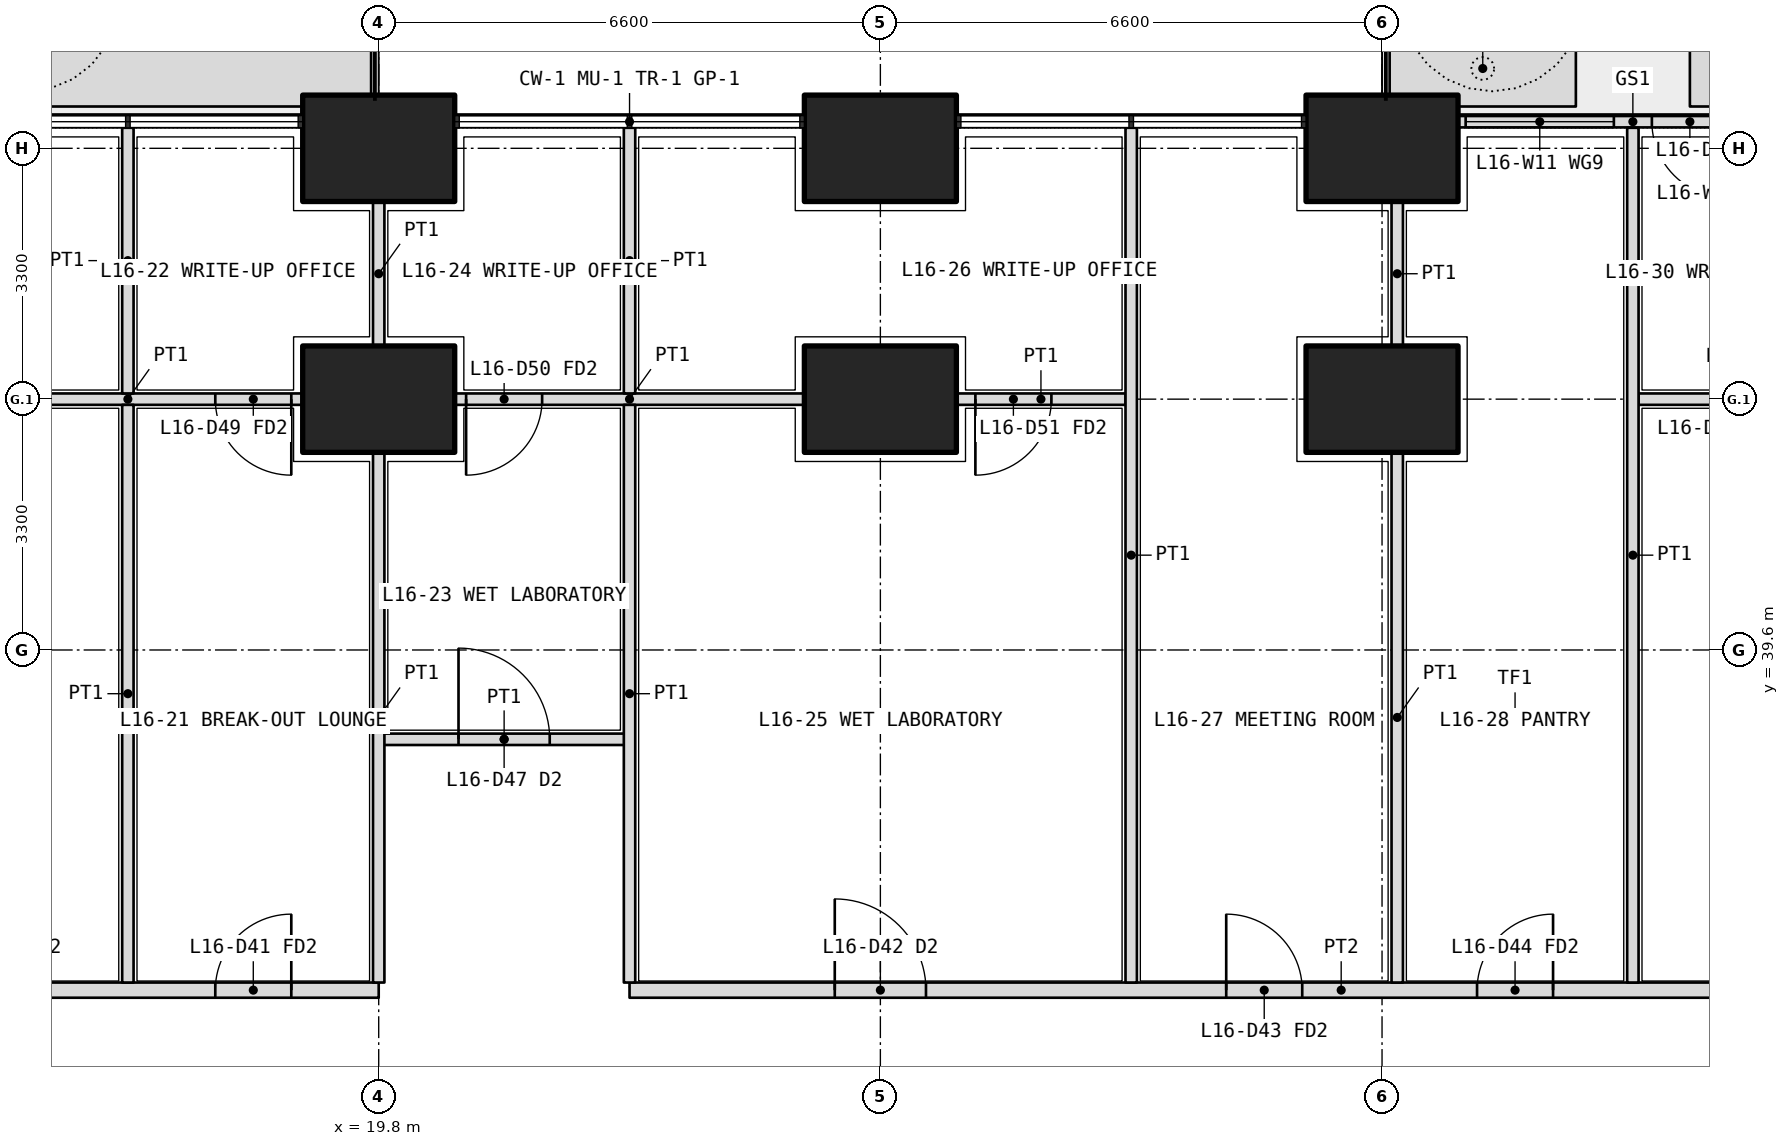
"""IFC4 building model, lengths in metres.
Left out: names, types, materials, properties, quantities, classifications, styles, units other than length and angle.
Written with IfcOpenShell. Run it as: python <this file> out.ifc"""

import sys

from ifc_helpers import new_model, si_unit, direction, frame, frame_2d, origin, origin_2d, place, context, subcontext, project, spatial, polyline, rectangle, outline, extrude, element, fill, save


model = new_model("IFC4")
c1 = context("Model", 3, precision=1e-05, world=origin(), true_north=direction((0.0, 1.0)))
c2 = subcontext(c1, "Body", "Model", "MODEL_VIEW")
j1 = project(units=[si_unit("LENGTHUNIT", "METRE"), si_unit("PLANEANGLEUNIT", "RADIAN")], contexts=[c1])
p1 = place(None, origin())
s1 = spatial("IfcSite", under=j1, at=p1, CompositionType="ELEMENT")
p2 = place(p1, origin())
s2 = spatial("IfcBuilding", under=s1, at=p2, CompositionType="ELEMENT")
p3 = place(p2, frame((0.0, 0.0, 71.7)))
s3 = spatial("IfcBuildingStorey", under=s2, at=p3, CompositionType="ELEMENT", Elevation=71.7)
for number, where, z_axis, x_axis in (
    (1, (19.8, 46.2, 0.0), (0.0, 0.0, 1.0), (1.0, 0.0, 0.0)),
    (2, (26.4, 46.2, 0.0), (0.0, 0.0, 1.0), (1.0, 0.0, 0.0)),
    (3, (33.0, 46.2, 0.0), (0.0, 0.0, 1.0), (1.0, 0.0, 0.0)),
    (4, (19.8, 42.9, 0.0), (0.0, 0.0, 1.0), (1.0, 0.0, 0.0)),
    (5, (26.4, 42.9, 0.0), (0.0, 0.0, 1.0), (1.0, 0.0, 0.0)),
    (6, (33.0, 42.9, 0.0), (0.0, 0.0, 1.0), (1.0, 0.0, 0.0)),
):
    element("IfcColumn", number, at=place(p3, frame(where, z_axis=z_axis, x_axis=x_axis)), inside=s3, PredefinedType="COLUMN", context=c2, shape_type="SweptSolid", body=[
        extrude(rectangle(XDim=2.0, YDim=1.4, at=origin_2d()), origin(), (0.0, 0.0, 1.0), 4.2),
    ])
p4 = place(p3, origin())
e7 = element("IfcWall", 7, at=p4, inside=s3, PredefinedType="USERDEFINED", context=c2, shape_type="SweptSolid", body=[
    extrude(outline(polyline([(10.65, 46.75), (19.7, 46.75), (19.7, 47.75), (10.65, 47.75), (10.65, 46.75)]), holes=[polyline([(10.8, 46.9), (19.55, 46.9), (19.55, 47.6), (10.8, 47.6), (10.8, 46.9)])]), origin(), (0.0, 0.0, 1.0), 1.05),
])
p5 = place(p3, origin())
e8 = element("IfcWall", 8, at=p5, inside=s3, PredefinedType="USERDEFINED", context=c2, shape_type="SweptSolid", body=[
    extrude(outline(polyline([(33.1, 46.75), (35.55, 46.75), (35.55, 47.75), (33.1, 47.75), (33.1, 46.75)]), holes=[polyline([(33.25, 46.9), (35.4, 46.9), (35.4, 47.6), (33.25, 47.6), (33.25, 46.9)])]), origin(), (0.0, 0.0, 1.0), 1.05),
])
p6 = place(p3, origin())
e9 = element("IfcWall", 9, at=p6, inside=s3, PredefinedType="USERDEFINED", context=c2, shape_type="SweptSolid", body=[
    extrude(outline(polyline([(37.05, 46.75), (46.1, 46.75), (46.1, 47.75), (37.05, 47.75), (37.05, 46.75)]), holes=[polyline([(37.2, 46.9), (45.95, 46.9), (45.95, 47.6), (37.2, 47.6), (37.2, 46.9)])]), origin(), (0.0, 0.0, 1.0), 1.05),
])
p7 = place(p3, frame((38.6, 46.55, 0.0), z_axis=(0.0, 0.0, 1.0), x_axis=(-1.0, 0.0, 0.0)))
e10 = element("IfcWall", 10, at=p7, inside=s3, PredefinedType="SOLIDWALL", context=c2, shape_type="SweptSolid", body=[
    extrude(rectangle(XDim=4.6, YDim=0.15, at=frame_2d((2.3, 0.0))), origin(), (0.0, 0.0, 1.0), 2.05),
])
p8 = place(p7, frame((1.05, 0.0, 0.0)))
e11 = element("IfcOpeningElement", 11, at=p8, cuts=e10, PredefinedType="OPENING", context=c2, shape_type="SweptSolid", body=[
    extrude(rectangle(XDim=1.0, YDim=2.0, at=frame_2d((0.5, 1.0))), frame((0.0, 0.085, 0.0), z_axis=(0.0, -1.0, 0.0), x_axis=(1.0, 0.0, 0.0)), (0.0, 0.0, 1.0), 0.17),
])
p9 = place(p7, frame((0.1, 0.0, 0.1)))
e12 = element("IfcOpeningElement", 12, at=p9, cuts=e10, PredefinedType="OPENING", context=c2, shape_type="SweptSolid", body=[
    extrude(rectangle(XDim=0.85, YDim=1.65, at=frame_2d((0.425, 0.825))), frame((0.0, 0.085, 0.0), z_axis=(0.0, -1.0, 0.0), x_axis=(1.0, 0.0, 0.0)), (0.0, 0.0, 1.0), 0.17),
])
p10 = place(p7, frame((2.55, 0.0, 0.1)))
e13 = element("IfcOpeningElement", 13, at=p10, cuts=e10, PredefinedType="OPENING", context=c2, shape_type="SweptSolid", body=[
    extrude(rectangle(XDim=1.95, YDim=1.65, at=frame_2d((0.975, 0.825))), frame((0.0, 0.085, 0.0), z_axis=(0.0, -1.0, 0.0), x_axis=(1.0, 0.0, 0.0)), (0.0, 0.0, 1.0), 0.17),
])
p11 = place(p3, frame((10.975, 35.125, 0.0), z_axis=(0.0, 0.0, 1.0), x_axis=(1.0, 0.0, 0.0)))
e14 = element("IfcWall", 14, at=p11, inside=s3, PredefinedType="PARTITIONING", context=c2, shape_type="SweptSolid", body=[
    extrude(rectangle(XDim=8.825, YDim=0.2, at=frame_2d((4.413, 0.0))), origin(), (0.0, 0.0, 1.0), 2.55),
])
p12 = place(p11, frame((2.312, 0.0, 0.0)))
e15 = element("IfcOpeningElement", 15, at=p12, cuts=e14, PredefinedType="OPENING", context=c2, shape_type="SweptSolid", body=[
    extrude(rectangle(XDim=1.0, YDim=2.1, at=frame_2d((0.5, 1.05))), frame((0.0, 0.11, 0.0), z_axis=(0.0, -1.0, 0.0), x_axis=(1.0, 0.0, 0.0)), (0.0, 0.0, 1.0), 0.22),
])
p13 = place(p11, frame((6.675, 0.0, 0.0)))
e16 = element("IfcOpeningElement", 16, at=p13, cuts=e14, PredefinedType="OPENING", context=c2, shape_type="SweptSolid", body=[
    extrude(rectangle(XDim=1.0, YDim=2.1, at=frame_2d((0.5, 1.05))), frame((0.0, 0.11, 0.0), z_axis=(0.0, -1.0, 0.0), x_axis=(1.0, 0.0, 0.0)), (0.0, 0.0, 1.0), 0.22),
])
p14 = place(p3, frame((23.1, 35.125, 0.0), z_axis=(0.0, 0.0, 1.0), x_axis=(1.0, 0.0, 0.0)))
e17 = element("IfcWall", 17, at=p14, inside=s3, PredefinedType="PARTITIONING", context=c2, shape_type="SweptSolid", body=[
    extrude(rectangle(XDim=18.725, YDim=0.2, at=frame_2d((9.362, 0.0))), origin(), (0.0, 0.0, 1.0), 2.55),
])
p15 = place(p14, frame((2.7, 0.0, 0.0)))
e18 = element("IfcOpeningElement", 18, at=p15, cuts=e17, PredefinedType="OPENING", context=c2, shape_type="SweptSolid", body=[
    extrude(rectangle(XDim=1.2, YDim=2.1, at=frame_2d((0.6, 1.05))), frame((0.0, 0.11, 0.0), z_axis=(0.0, -1.0, 0.0), x_axis=(1.0, 0.0, 0.0)), (0.0, 0.0, 1.0), 0.22),
])
p16 = place(p14, frame((7.85, 0.0, 0.0)))
e19 = element("IfcOpeningElement", 19, at=p16, cuts=e17, PredefinedType="OPENING", context=c2, shape_type="SweptSolid", body=[
    extrude(rectangle(XDim=1.0, YDim=2.1, at=frame_2d((0.5, 1.05))), frame((0.0, 0.11, 0.0), z_axis=(0.0, -1.0, 0.0), x_axis=(1.0, 0.0, 0.0)), (0.0, 0.0, 1.0), 0.22),
])
p17 = place(p14, frame((11.15, 0.0, 0.0)))
e20 = element("IfcOpeningElement", 20, at=p17, cuts=e17, PredefinedType="OPENING", context=c2, shape_type="SweptSolid", body=[
    extrude(rectangle(XDim=1.0, YDim=2.1, at=frame_2d((0.5, 1.05))), frame((0.0, 0.11, 0.0), z_axis=(0.0, -1.0, 0.0), x_axis=(1.0, 0.0, 0.0)), (0.0, 0.0, 1.0), 0.22),
])
p18 = place(p14, frame((15.312, 0.0, 0.0)))
e21 = element("IfcOpeningElement", 21, at=p18, cuts=e17, PredefinedType="OPENING", context=c2, shape_type="SweptSolid", body=[
    extrude(rectangle(XDim=1.2, YDim=2.1, at=frame_2d((0.6, 1.05))), frame((0.0, 0.11, 0.0), z_axis=(0.0, -1.0, 0.0), x_axis=(1.0, 0.0, 0.0)), (0.0, 0.0, 1.0), 0.22),
])
p19 = place(p3, frame((38.6, 42.9, 0.0), z_axis=(0.0, 0.0, 1.0), x_axis=(-1.0, 0.0, 0.0)))
e22 = element("IfcWall", 22, at=p19, inside=s3, PredefinedType="PARTITIONING", context=c2, shape_type="SweptSolid", body=[
    extrude(rectangle(XDim=2.225, YDim=0.15, at=frame_2d((1.113, 0.0))), origin(), (0.0, 0.0, 1.0), 2.55),
])
p20 = place(p19, frame((0.25, 0.0, 0.0)))
e23 = element("IfcOpeningElement", 23, at=p20, cuts=e22, PredefinedType="OPENING", context=c2, shape_type="SweptSolid", body=[
    extrude(rectangle(XDim=1.0, YDim=2.1, at=frame_2d((0.5, 1.05))), frame((0.0, 0.085, 0.0), z_axis=(0.0, -1.0, 0.0), x_axis=(1.0, 0.0, 0.0)), (0.0, 0.0, 1.0), 0.17),
])
p21 = place(p3, frame((29.625, 42.9, 0.0), z_axis=(0.0, 0.0, 1.0), x_axis=(-1.0, 0.0, 0.0)))
e24 = element("IfcWall", 24, at=p21, inside=s3, PredefinedType="PARTITIONING", context=c2, shape_type="SweptSolid", body=[
    extrude(rectangle(XDim=2.225, YDim=0.15, at=frame_2d((1.113, 0.0))), origin(), (0.0, 0.0, 1.0), 2.55),
])
p22 = place(p21, frame((0.975, 0.0, 0.0)))
e25 = element("IfcOpeningElement", 25, at=p22, cuts=e24, PredefinedType="OPENING", context=c2, shape_type="SweptSolid", body=[
    extrude(rectangle(XDim=1.0, YDim=2.1, at=frame_2d((0.5, 1.05))), frame((0.0, 0.085, 0.0), z_axis=(0.0, -1.0, 0.0), x_axis=(1.0, 0.0, 0.0)), (0.0, 0.0, 1.0), 0.17),
])
p23 = place(p3, frame((25.4, 42.9, 0.0), z_axis=(0.0, 0.0, 1.0), x_axis=(-1.0, 0.0, 0.0)))
e26 = element("IfcWall", 26, at=p23, inside=s3, PredefinedType="PARTITIONING", context=c2, shape_type="SweptSolid", body=[
    extrude(rectangle(XDim=4.6, YDim=0.15, at=frame_2d((2.3, 0.0))), origin(), (0.0, 0.0, 1.0), 2.55),
])
p24 = place(p23, frame((3.45, 0.0, 0.0)))
e27 = element("IfcOpeningElement", 27, at=p24, cuts=e26, PredefinedType="OPENING", context=c2, shape_type="SweptSolid", body=[
    extrude(rectangle(XDim=1.0, YDim=2.1, at=frame_2d((0.5, 1.05))), frame((0.0, 0.085, 0.0), z_axis=(0.0, -1.0, 0.0), x_axis=(1.0, 0.0, 0.0)), (0.0, 0.0, 1.0), 0.17),
])
p25 = place(p3, frame((18.8, 42.9, 0.0), z_axis=(0.0, 0.0, 1.0), x_axis=(-1.0, 0.0, 0.0)))
e28 = element("IfcWall", 28, at=p25, inside=s3, PredefinedType="PARTITIONING", context=c2, shape_type="SweptSolid", body=[
    extrude(rectangle(XDim=4.6, YDim=0.15, at=frame_2d((2.3, 0.0))), origin(), (0.0, 0.0, 1.0), 2.55),
])
p26 = place(p25, frame((0.15, 0.0, 0.0)))
e29 = element("IfcOpeningElement", 29, at=p26, cuts=e28, PredefinedType="OPENING", context=c2, shape_type="SweptSolid", body=[
    extrude(rectangle(XDim=1.0, YDim=2.1, at=frame_2d((0.5, 1.05))), frame((0.0, 0.085, 0.0), z_axis=(0.0, -1.0, 0.0), x_axis=(1.0, 0.0, 0.0)), (0.0, 0.0, 1.0), 0.17),
])
p27 = place(p3, frame((19.8, 38.425, 0.0), z_axis=(0.0, 0.0, 1.0), x_axis=(1.0, 0.0, 0.0)))
e30 = element("IfcWall", 30, at=p27, inside=s3, PredefinedType="PARTITIONING", context=c2, shape_type="SweptSolid", body=[
    extrude(rectangle(XDim=3.3, YDim=0.15, at=frame_2d((1.65, 0.0))), origin(), (0.0, 0.0, 1.0), 2.55),
])
p28 = place(p27, frame((1.05, 0.0, 0.0)))
e31 = element("IfcOpeningElement", 31, at=p28, cuts=e30, PredefinedType="OPENING", context=c2, shape_type="SweptSolid", body=[
    extrude(rectangle(XDim=1.2, YDim=2.1, at=frame_2d((0.6, 1.05))), frame((0.0, 0.085, 0.0), z_axis=(0.0, -1.0, 0.0), x_axis=(1.0, 0.0, 0.0)), (0.0, 0.0, 1.0), 0.17),
])
p29 = place(p3, frame((33.2, 45.5, 0.0), z_axis=(0.0, 0.0, 1.0), x_axis=(0.0, -1.0, 0.0)))
e32 = element("IfcWall", 32, at=p29, inside=s3, PredefinedType="PARTITIONING", context=c2, shape_type="SweptSolid", body=[
    extrude(rectangle(XDim=1.9, YDim=0.15, at=frame_2d((0.95, 0.0))), origin(), (0.0, 0.0, 1.0), 2.55),
])
p30 = place(p3, frame((33.2, 42.2, 0.0), z_axis=(0.0, 0.0, 1.0), x_axis=(0.0, -1.0, 0.0)))
e33 = element("IfcWall", 33, at=p30, inside=s3, PredefinedType="PARTITIONING", context=c2, shape_type="SweptSolid", body=[
    extrude(rectangle(XDim=6.975, YDim=0.15, at=frame_2d((3.487, 0.0))), origin(), (0.0, 0.0, 1.0), 2.55),
])
p31 = place(p3, frame((36.3, 46.47, 0.0), z_axis=(0.0, 0.0, 1.0), x_axis=(0.0, -1.0, 0.0)))
e34 = element("IfcWall", 34, at=p31, inside=s3, PredefinedType="PARTITIONING", context=c2, shape_type="SweptSolid", body=[
    extrude(rectangle(XDim=11.245, YDim=0.15, at=frame_2d((5.623, 0.0))), origin(), (0.0, 0.0, 1.0), 3.85),
])
p32 = place(p3, frame((16.5, 46.47, 0.0), z_axis=(0.0, 0.0, 1.0), x_axis=(0.0, -1.0, 0.0)))
e35 = element("IfcWall", 35, at=p32, inside=s3, PredefinedType="PARTITIONING", context=c2, shape_type="SweptSolid", body=[
    extrude(rectangle(XDim=3.495, YDim=0.15, at=frame_2d((1.748, 0.0))), origin(), (0.0, 0.0, 1.0), 3.85),
])
p33 = place(p3, frame((16.5, 42.825, 0.0), z_axis=(0.0, 0.0, 1.0), x_axis=(0.0, -1.0, 0.0)))
e36 = element("IfcWall", 36, at=p33, inside=s3, PredefinedType="PARTITIONING", context=c2, shape_type="SweptSolid", body=[
    extrude(rectangle(XDim=7.6, YDim=0.15, at=frame_2d((3.8, 0.0))), origin(), (0.0, 0.0, 1.0), 3.85),
])
p34 = place(p3, frame((19.8, 45.5, 0.0), z_axis=(0.0, 0.0, 1.0), x_axis=(0.0, -1.0, 0.0)))
e37 = element("IfcWall", 37, at=p34, inside=s3, PredefinedType="PARTITIONING", context=c2, shape_type="SweptSolid", body=[
    extrude(rectangle(XDim=1.9, YDim=0.15, at=frame_2d((0.95, 0.0))), origin(), (0.0, 0.0, 1.0), 2.55),
])
p35 = place(p3, frame((19.8, 42.2, 0.0), z_axis=(0.0, 0.0, 1.0), x_axis=(0.0, -1.0, 0.0)))
e38 = element("IfcWall", 38, at=p35, inside=s3, PredefinedType="PARTITIONING", context=c2, shape_type="SweptSolid", body=[
    extrude(rectangle(XDim=6.975, YDim=0.15, at=frame_2d((3.487, 0.0))), origin(), (0.0, 0.0, 1.0), 2.55),
])
p36 = place(p3, frame((23.1, 46.47, 0.0), z_axis=(0.0, 0.0, 1.0), x_axis=(0.0, -1.0, 0.0)))
e39 = element("IfcWall", 39, at=p36, inside=s3, PredefinedType="PARTITIONING", context=c2, shape_type="SweptSolid", body=[
    extrude(rectangle(XDim=3.495, YDim=0.15, at=frame_2d((1.748, 0.0))), origin(), (0.0, 0.0, 1.0), 3.85),
])
p37 = place(p3, frame((23.1, 42.825, 0.0), z_axis=(0.0, 0.0, 1.0), x_axis=(0.0, -1.0, 0.0)))
e40 = element("IfcWall", 40, at=p37, inside=s3, PredefinedType="PARTITIONING", context=c2, shape_type="SweptSolid", body=[
    extrude(rectangle(XDim=7.6, YDim=0.15, at=frame_2d((3.8, 0.0))), origin(), (0.0, 0.0, 1.0), 3.85),
])
p38 = place(p3, frame((29.7, 46.47, 0.0), z_axis=(0.0, 0.0, 1.0), x_axis=(0.0, -1.0, 0.0)))
e41 = element("IfcWall", 41, at=p38, inside=s3, PredefinedType="PARTITIONING", context=c2, shape_type="SweptSolid", body=[
    extrude(rectangle(XDim=11.245, YDim=0.15, at=frame_2d((5.623, 0.0))), origin(), (0.0, 0.0, 1.0), 3.85),
])
p39 = place(p8, origin())
e42 = element("IfcDoor", 42, at=p39, inside=s3, OperationType="SINGLE_SWING_LEFT", PredefinedType="DOOR", context=c2, shape_type="SweptSolid", body=[
    extrude(rectangle(XDim=1.0, YDim=2.0, at=frame_2d((0.5, 1.0))), frame((0.0, 0.025, 0.0), z_axis=(0.0, -1.0, 0.0), x_axis=(1.0, 0.0, 0.0)), (0.0, 0.0, 1.0), 0.05),
])
fill(e11, e42)
p40 = place(p10, origin())
e43 = element("IfcWindow", 43, at=p40, inside=s3, PartitioningType="SINGLE_PANEL", PredefinedType="WINDOW", context=c2, shape_type="SweptSolid", body=[
    extrude(rectangle(XDim=1.95, YDim=1.65, at=frame_2d((0.975, 0.825))), frame((0.0, 0.03, 0.0), z_axis=(0.0, -1.0, 0.0), x_axis=(1.0, 0.0, 0.0)), (0.0, 0.0, 1.0), 0.06),
])
fill(e13, e43)
p41 = place(p13, origin())
e44 = element("IfcDoor", 44, at=p41, inside=s3, OperationType="SINGLE_SWING_RIGHT", PredefinedType="DOOR", context=c2, shape_type="SweptSolid", body=[
    extrude(rectangle(XDim=1.0, YDim=2.1, at=frame_2d((0.5, 1.05))), frame((0.0, 0.025, 0.0), z_axis=(0.0, -1.0, 0.0), x_axis=(1.0, 0.0, 0.0)), (0.0, 0.0, 1.0), 0.05),
])
fill(e16, e44)
p42 = place(p26, origin())
e45 = element("IfcDoor", 45, at=p42, inside=s3, OperationType="SINGLE_SWING_LEFT", PredefinedType="DOOR", context=c2, shape_type="SweptSolid", body=[
    extrude(rectangle(XDim=1.0, YDim=2.1, at=frame_2d((0.5, 1.05))), frame((0.0, 0.025, 0.0), z_axis=(0.0, -1.0, 0.0), x_axis=(1.0, 0.0, 0.0)), (0.0, 0.0, 1.0), 0.05),
])
fill(e29, e45)
p43 = place(p28, origin())
e46 = element("IfcDoor", 46, at=p43, inside=s3, OperationType="DOUBLE_DOOR_SINGLE_SWING", PredefinedType="DOOR", context=c2, shape_type="SweptSolid", body=[
    extrude(rectangle(XDim=1.2, YDim=2.1, at=frame_2d((0.6, 1.05))), frame((0.0, 0.025, 0.0), z_axis=(0.0, -1.0, 0.0), x_axis=(1.0, 0.0, 0.0)), (0.0, 0.0, 1.0), 0.05),
])
fill(e31, e46)
p44 = place(p24, origin())
e47 = element("IfcDoor", 47, at=p44, inside=s3, OperationType="SINGLE_SWING_RIGHT", PredefinedType="DOOR", context=c2, shape_type="SweptSolid", body=[
    extrude(rectangle(XDim=1.0, YDim=2.1, at=frame_2d((0.5, 1.05))), frame((0.0, 0.025, 0.0), z_axis=(0.0, -1.0, 0.0), x_axis=(1.0, 0.0, 0.0)), (0.0, 0.0, 1.0), 0.05),
])
fill(e27, e47)
p45 = place(p15, origin())
e48 = element("IfcDoor", 48, at=p45, inside=s3, OperationType="DOUBLE_DOOR_SINGLE_SWING", PredefinedType="DOOR", context=c2, shape_type="SweptSolid", body=[
    extrude(rectangle(XDim=1.2, YDim=2.1, at=frame_2d((0.6, 1.05))), frame((0.0, 0.025, 0.0), z_axis=(0.0, -1.0, 0.0), x_axis=(1.0, 0.0, 0.0)), (0.0, 0.0, 1.0), 0.05),
])
fill(e18, e48)
p46 = place(p22, origin())
e49 = element("IfcDoor", 49, at=p46, inside=s3, OperationType="SINGLE_SWING_RIGHT", PredefinedType="DOOR", context=c2, shape_type="SweptSolid", body=[
    extrude(rectangle(XDim=1.0, YDim=2.1, at=frame_2d((0.5, 1.05))), frame((0.0, 0.025, 0.0), z_axis=(0.0, -1.0, 0.0), x_axis=(1.0, 0.0, 0.0)), (0.0, 0.0, 1.0), 0.05),
])
fill(e25, e49)
p47 = place(p16, origin())
e50 = element("IfcDoor", 50, at=p47, inside=s3, OperationType="SINGLE_SWING_LEFT", PredefinedType="DOOR", context=c2, shape_type="SweptSolid", body=[
    extrude(rectangle(XDim=1.0, YDim=2.1, at=frame_2d((0.5, 1.05))), frame((0.0, 0.025, 0.0), z_axis=(0.0, -1.0, 0.0), x_axis=(1.0, 0.0, 0.0)), (0.0, 0.0, 1.0), 0.05),
])
fill(e19, e50)
p48 = place(p17, origin())
e51 = element("IfcDoor", 51, at=p48, inside=s3, OperationType="SINGLE_SWING_RIGHT", PredefinedType="DOOR", context=c2, shape_type="SweptSolid", body=[
    extrude(rectangle(XDim=1.0, YDim=2.1, at=frame_2d((0.5, 1.05))), frame((0.0, 0.025, 0.0), z_axis=(0.0, -1.0, 0.0), x_axis=(1.0, 0.0, 0.0)), (0.0, 0.0, 1.0), 0.05),
])
fill(e20, e51)
save(model, sys.argv[1])
